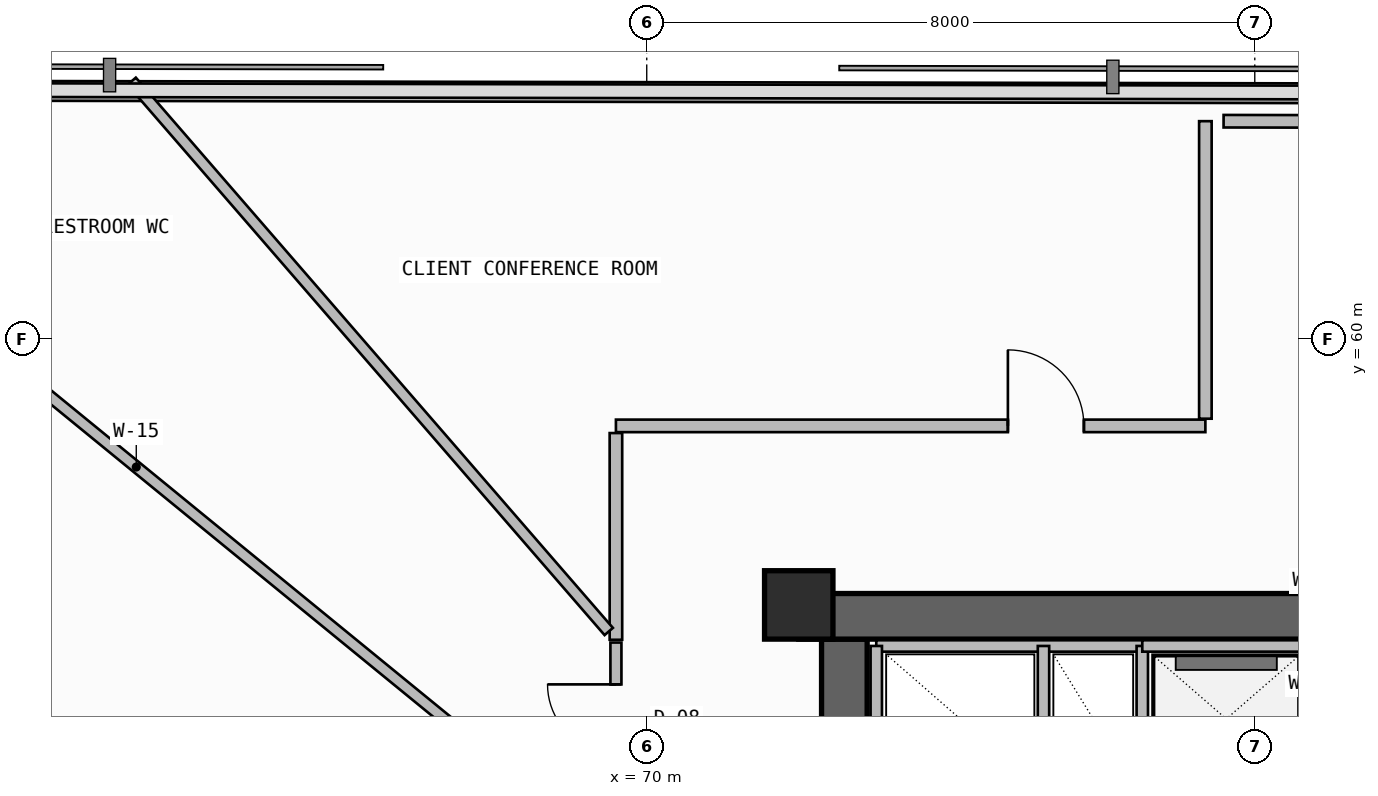
"""IFC4 building model, lengths in metres.
Left out: names, types, materials, properties, quantities, classifications, styles, units other than length and angle.
Written with IfcOpenShell. Run it as: python <this file> out.ifc"""

import sys

from ifc_helpers import new_model, si_unit, direction, frame, frame_2d, origin, origin_2d, place, context, subcontext, project, spatial, rectangle, extrude, element, fill, save


model = new_model("IFC4")
c1 = context("Model", 3, precision=1e-05, world=origin(), true_north=direction((0.0, 1.0)))
c2 = subcontext(c1, "Body", "Model", "MODEL_VIEW")
j1 = project(units=[si_unit("LENGTHUNIT", "METRE"), si_unit("PLANEANGLEUNIT", "RADIAN")], contexts=[c1])
p1 = place(None, origin())
s1 = spatial("IfcSite", under=j1, at=p1, CompositionType="ELEMENT")
p2 = place(p1, origin())
s2 = spatial("IfcBuilding", under=s1, at=p2, CompositionType="ELEMENT")
p3 = place(p2, frame((0.0, 0.0, 243.14)))
s3 = spatial("IfcBuildingStorey", under=s2, at=p3, CompositionType="ELEMENT", Elevation=243.14)
p4 = place(p3, frame((72.6, 43.35, -0.26), z_axis=(0.0, 0.0, 1.0), x_axis=(0.0, 1.0, 0.0)))
e1 = element("IfcWall", 1, at=p4, inside=s3, PredefinedType="SHEAR", context=c2, shape_type="SweptSolid", body=[
    extrude(rectangle(XDim=12.7, YDim=0.6, at=frame_2d((6.35, 0.0))), origin(), (0.0, 0.0, 1.0), 3.52),
])
p5 = place(p4, frame((1.35, 0.0, 0.26)))
e2 = element("IfcOpeningElement", 2, at=p5, cuts=e1, PredefinedType="OPENING", context=c2, shape_type="SweptSolid", body=[
    extrude(rectangle(XDim=1.2, YDim=2.2, at=frame_2d((0.6, 1.1))), frame((0.0, 0.31, 0.0), z_axis=(0.0, -1.0, 0.0), x_axis=(1.0, 0.0, 0.0)), (0.0, 0.0, 1.0), 0.62),
])
p6 = place(p3, frame((72.0, 56.35, -0.26), z_axis=(0.0, 0.0, 1.0), x_axis=(1.0, 0.0, 0.0)))
e3 = element("IfcWall", 3, at=p6, inside=s3, PredefinedType="SHEAR", context=c2, shape_type="SweptSolid", body=[
    extrude(rectangle(XDim=13.6, YDim=0.6, at=frame_2d((6.8, 0.0))), origin(), (0.0, 0.0, 1.0), 3.52),
])
p7 = place(p3, frame((72.0, 56.5, 0.0), z_axis=(0.0, 0.0, 1.0), x_axis=(1.0, 0.0, 0.0)))
e4 = element("IfcColumn", 4, at=p7, inside=s3, PredefinedType="COLUMN", context=c2, shape_type="SweptSolid", body=[
    extrude(rectangle(XDim=0.9, YDim=0.9, at=origin_2d()), origin(), (0.0, 0.0, 1.0), 3.52),
])
p8 = place(p3, frame((55.475, 56.45, -0.26), z_axis=(0.0, 0.0, 1.0), x_axis=(0.591309555876, -0.806444672082, 0.0)))
e5 = element("IfcWall", 5, at=p8, inside=s3, PredefinedType="SHEAR", context=c2, shape_type="SweptSolid", body=[
    extrude(rectangle(XDim=18.192, YDim=0.55, at=frame_2d((9.096, 0.0))), origin(), (0.0, 0.0, 1.0), 3.52),
])
p9 = place(p3, frame((83.332, 63.193, 0.0), z_axis=(0.0, 0.0, 1.0), x_axis=(-0.999998363757, 0.001809000383, 0.0)))
e6 = element("IfcWall", 6, at=p9, inside=s3, PredefinedType="PARAPET", context=c2, shape_type="SweptSolid", body=[
    extrude(rectangle(XDim=25.777, YDim=0.2, at=frame_2d((12.889, 0.0))), origin(), (0.0, 0.0, 1.0), 1.15),
])
p10 = place(p3, frame((73.02, 55.96, 0.0), z_axis=(0.0, 0.0, 1.0), x_axis=(1.0, 0.0, 0.0)))
e7 = element("IfcWall", 7, at=p10, inside=s3, PredefinedType="SOLIDWALL", context=c2, shape_type="SweptSolid", body=[
    extrude(rectangle(XDim=3.5, YDim=0.15, at=frame_2d((1.75, 0.0))), origin(), (0.0, 0.0, 1.0), 3.26),
])
p11 = place(p3, frame((73.02, 54.02, 0.0), z_axis=(0.0, 0.0, 1.0), x_axis=(0.0, 1.0, 0.0)))
e8 = element("IfcWall", 8, at=p11, inside=s3, PredefinedType="PLUMBINGWALL", context=c2, shape_type="SweptSolid", body=[
    extrude(rectangle(XDim=1.94, YDim=0.15, at=frame_2d((0.97, 0.0))), origin(), (0.0, 0.0, 1.0), 3.26),
])
p12 = place(p3, frame((76.52, 54.02, 0.0), z_axis=(0.0, 0.0, 1.0), x_axis=(0.0, 1.0, 0.0)))
e9 = element("IfcWall", 9, at=p12, inside=s3, PredefinedType="SOLIDWALL", context=c2, shape_type="SweptSolid", body=[
    extrude(rectangle(XDim=1.94, YDim=0.15, at=frame_2d((0.97, 0.0))), origin(), (0.0, 0.0, 1.0), 3.26),
])
p13 = place(p3, frame((75.22, 54.02, 0.0), z_axis=(0.0, 0.0, 1.0), x_axis=(0.0, 1.0, 0.0)))
e10 = element("IfcWall", 10, at=p13, inside=s3, PredefinedType="PLUMBINGWALL", context=c2, shape_type="SweptSolid", body=[
    extrude(rectangle(XDim=1.94, YDim=0.15, at=frame_2d((0.97, 0.0))), origin(), (0.0, 0.0, 1.0), 3.26),
])
p14 = place(p3, frame((76.52, 55.96, 0.0), z_axis=(0.0, 0.0, 1.0), x_axis=(1.0, 0.0, 0.0)))
e11 = element("IfcWall", 11, at=p14, inside=s3, PredefinedType="SOLIDWALL", context=c2, shape_type="SweptSolid", body=[
    extrude(rectangle(XDim=6.7, YDim=0.15, at=frame_2d((3.35, 0.0))), origin(), (0.0, 0.0, 1.0), 3.26),
])
p15 = place(p3, frame((79.65, 62.86, 0.0), z_axis=(0.0, 0.0, 1.0), x_axis=(-0.999998420319, 0.001777458977, 0.0)))
e12 = element("IfcWall", 12, at=p15, inside=s3, PredefinedType="PARTITIONING", context=c2, shape_type="SweptSolid", body=[
    extrude(rectangle(XDim=2.06, YDim=0.165, at=frame_2d((1.03, 0.0))), origin(), (0.0, 0.0, 1.0), 3.26),
])
p16 = place(p3, frame((77.35, 58.855, 0.0), z_axis=(0.0, 0.0, 1.0), x_axis=(-1.0, 0.0, 0.0)))
e13 = element("IfcWall", 13, at=p16, inside=s3, PredefinedType="PARTITIONING", context=c2, shape_type="SweptSolid", body=[
    extrude(rectangle(XDim=7.756, YDim=0.165, at=frame_2d((3.878, 0.0))), origin(), (0.0, 0.0, 1.0), 3.26),
])
p17 = place(p16, frame((1.598, 0.0, 0.0)))
e14 = element("IfcOpeningElement", 14, at=p17, cuts=e13, PredefinedType="OPENING", context=c2, shape_type="SweptSolid", body=[
    extrude(rectangle(XDim=1.0, YDim=2.2, at=frame_2d((0.5, 1.1))), frame((0.0, 0.093, 0.0), z_axis=(0.0, -1.0, 0.0), x_axis=(1.0, 0.0, 0.0)), (0.0, 0.0, 1.0), 0.185),
])
p18 = place(p3, frame((77.35, 62.864, 0.0), z_axis=(0.0, 0.0, 1.0), x_axis=(0.0, -1.0, 0.0)))
e15 = element("IfcWall", 15, at=p18, inside=s3, PredefinedType="PARTITIONING", context=c2, shape_type="SweptSolid", body=[
    extrude(rectangle(XDim=3.914, YDim=0.165, at=frame_2d((1.957, 0.0))), origin(), (0.0, 0.0, 1.0), 3.26),
])
p19 = place(p3, frame((69.594, 58.761, 0.0), z_axis=(0.0, 0.0, 1.0), x_axis=(0.0, -1.0, 0.0)))
e16 = element("IfcWall", 16, at=p19, inside=s3, PredefinedType="PARTITIONING", context=c2, shape_type="SweptSolid", body=[
    extrude(rectangle(XDim=2.72, YDim=0.165, at=frame_2d((1.36, 0.0))), origin(), (0.0, 0.0, 1.0), 2.745),
])
p20 = place(p3, frame((69.5, 56.15, 0.0), z_axis=(0.0, 0.0, 1.0), x_axis=(-0.655072155805, 0.755566324481, 0.0)))
e17 = element("IfcWall", 17, at=p20, inside=s3, PredefinedType="PARTITIONING", context=c2, shape_type="SweptSolid", body=[
    extrude(rectangle(XDim=9.582, YDim=0.145, at=frame_2d((4.791, 0.0))), origin(), (0.0, 0.0, 1.0), 2.745),
])
p21 = place(p3, frame((69.594, 56.005, 0.0), z_axis=(0.0, 0.0, 1.0), x_axis=(0.0, -1.0, 0.0)))
e18 = element("IfcWall", 18, at=p21, inside=s3, PredefinedType="PARTITIONING", context=c2, shape_type="SweptSolid", body=[
    extrude(rectangle(XDim=2.893, YDim=0.145, at=frame_2d((1.447, 0.0))), origin(), (0.0, 0.0, 1.0), 3.26),
])
p22 = place(p21, frame((0.551, 0.0, 0.0)))
e19 = element("IfcOpeningElement", 19, at=p22, cuts=e18, PredefinedType="OPENING", context=c2, shape_type="SweptSolid", body=[
    extrude(rectangle(XDim=0.9, YDim=2.1, at=frame_2d((0.45, 1.05))), frame((0.0, 0.083, 0.0), z_axis=(0.0, -1.0, 0.0), x_axis=(1.0, 0.0, 0.0)), (0.0, 0.0, 1.0), 0.165),
])
p23 = place(p3, frame((69.51, 53.227, 0.0), z_axis=(0.0, 0.0, 1.0), x_axis=(-0.77440491792, 0.632690305838, 0.0)))
e20 = element("IfcWall", 20, at=p23, inside=s3, PredefinedType="PARTITIONING", context=c2, shape_type="SweptSolid", body=[
    extrude(rectangle(XDim=16.08, YDim=0.145, at=frame_2d((8.04, 0.0))), origin(), (0.0, 0.0, 1.0), 2.645),
])
p24 = place(p3, frame((69.5, 50.234, 0.0), z_axis=(0.0, 0.0, 1.0), x_axis=(-0.897284327813, 0.441453094972, 0.0)))
e21 = element("IfcWall", 21, at=p24, inside=s3, PredefinedType="PARTITIONING", context=c2, shape_type="SweptSolid", body=[
    extrude(rectangle(XDim=17.099, YDim=0.125, at=frame_2d((8.549, 0.0))), origin(), (0.0, 0.0, 1.0), 2.645),
])
p25 = place(p17, frame((1.0, 0.0, 0.0), z_axis=(0.0, 0.0, 1.0), x_axis=(-1.0, 0.0, 0.0)))
e22 = element("IfcDoor", 22, at=p25, inside=s3, OperationType="SINGLE_SWING_LEFT", PredefinedType="DOOR", context=c2, shape_type="SweptSolid", body=[
    extrude(rectangle(XDim=1.0, YDim=2.2, at=frame_2d((0.5, 1.1))), frame((0.0, 0.025, 0.0), z_axis=(0.0, -1.0, 0.0), x_axis=(1.0, 0.0, 0.0)), (0.0, 0.0, 1.0), 0.05),
])
fill(e14, e22)
p26 = place(p22, frame((0.9, 0.0, 0.0), z_axis=(0.0, 0.0, 1.0), x_axis=(-1.0, 0.0, 0.0)))
e23 = element("IfcDoor", 23, at=p26, inside=s3, OperationType="SINGLE_SWING_RIGHT", PredefinedType="DOOR", context=c2, shape_type="SweptSolid", body=[
    extrude(rectangle(XDim=0.9, YDim=2.1, at=frame_2d((0.45, 1.05))), frame((0.0, 0.025, 0.0), z_axis=(0.0, -1.0, 0.0), x_axis=(1.0, 0.0, 0.0)), (0.0, 0.0, 1.0), 0.05),
])
fill(e19, e23)
save(model, sys.argv[1])
